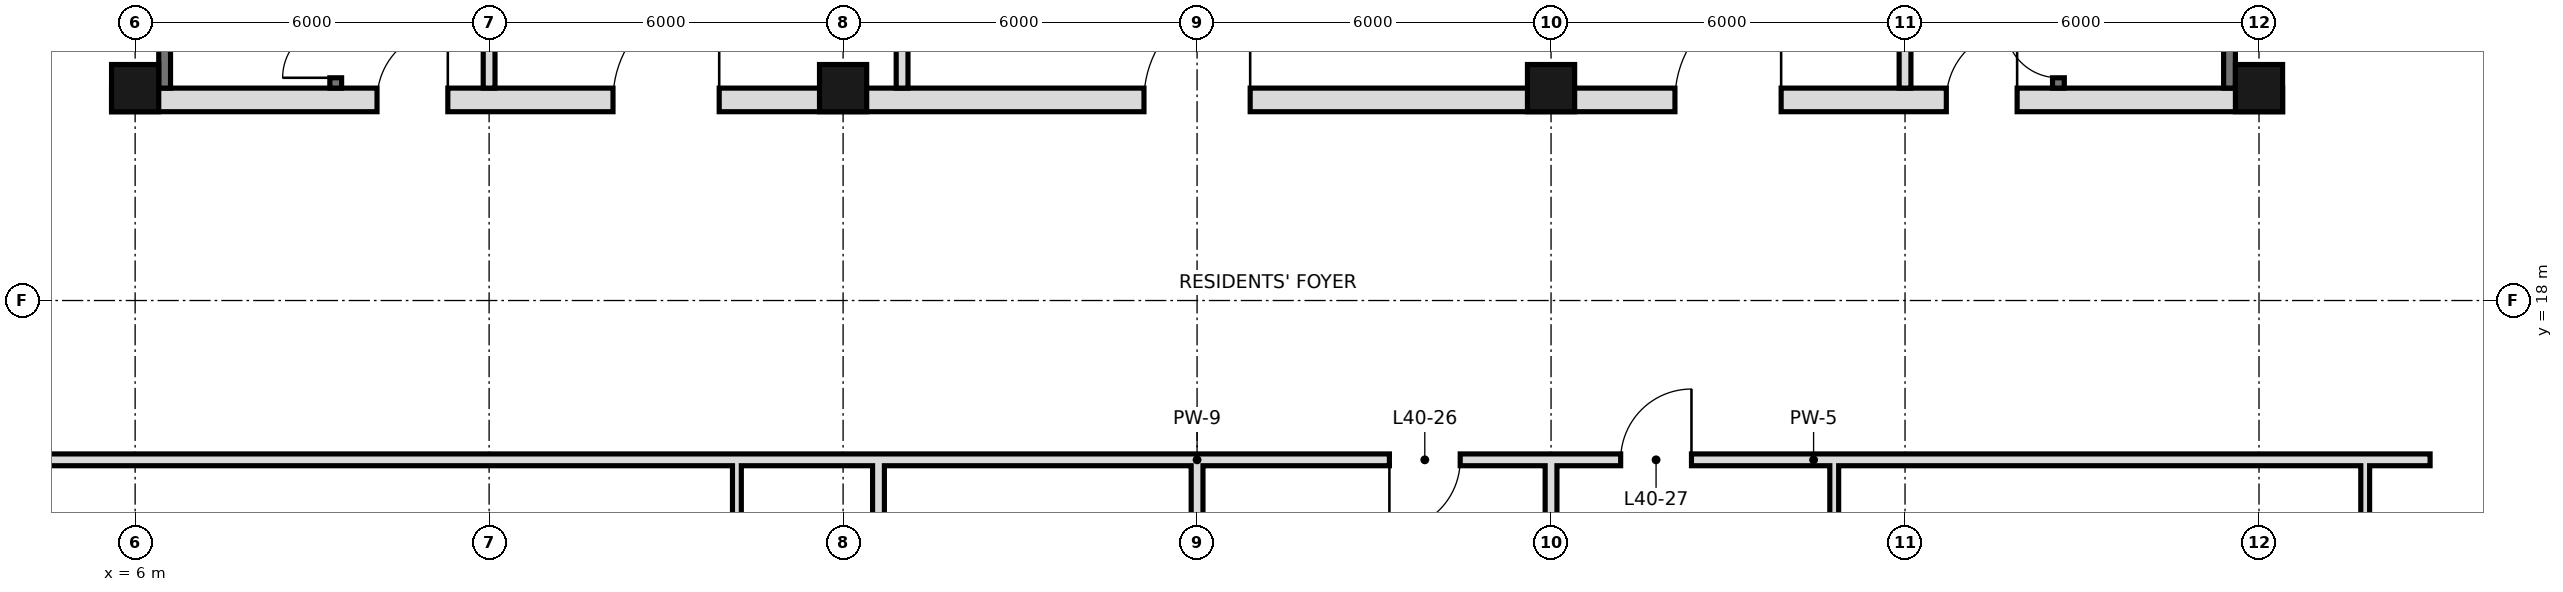
"""IFC4 building model, lengths in metres.
Left out: names, types, materials, properties, quantities, classifications, styles, units other than length and angle.
Written with IfcOpenShell. Run it as: python <this file> out.ifc"""

import sys

from ifc_helpers import new_model, si_unit, direction, frame, frame_2d, origin, origin_2d, place, context, subcontext, project, spatial, rectangle, hollow_rectangle, extrude, element, fill, save


model = new_model("IFC4")
c1 = context("Model", 3, precision=1e-05, world=origin(), true_north=direction((0.0, 1.0)))
c2 = subcontext(c1, "Body", "Model", "MODEL_VIEW")
j1 = project(units=[si_unit("LENGTHUNIT", "METRE"), si_unit("PLANEANGLEUNIT", "RADIAN")], contexts=[c1])
p1 = place(None, origin())
s1 = spatial("IfcSite", under=j1, at=p1, CompositionType="ELEMENT")
p2 = place(p1, origin())
s2 = spatial("IfcBuilding", under=s1, at=p2, CompositionType="ELEMENT")
p3 = place(p2, frame((0.0, 0.0, 174.4)))
s3 = spatial("IfcBuildingStorey", under=s2, at=p3, CompositionType="ELEMENT", Elevation=174.4)
for number, where, z_axis, x_axis in (
    (1, (6.0, 21.6, 0.0), (0.0, 0.0, 1.0), (1.0, 0.0, 0.0)),
    (2, (18.0, 21.6, 0.0), (0.0, 0.0, 1.0), (1.0, 0.0, 0.0)),
    (3, (30.0, 21.6, 0.0), (0.0, 0.0, 1.0), (1.0, 0.0, 0.0)),
    (4, (42.0, 21.6, 0.0), (0.0, 0.0, 1.0), (1.0, 0.0, 0.0)),
):
    element("IfcColumn", number, at=place(p3, frame(where, z_axis=z_axis, x_axis=x_axis)), inside=s3, PredefinedType="COLUMN", context=c2, shape_type="SweptSolid", body=[
        extrude(hollow_rectangle(XDim=0.8, YDim=0.8, WallThickness=0.045, at=origin_2d()), origin(), (0.0, 0.0, 1.0), 3.6),
    ])
p4 = place(p3, frame((16.2, 10.8, 0.0), z_axis=(0.0, 0.0, 1.0), x_axis=(0.0, 1.0, 0.0)))
e5 = element("IfcWall", 5, at=p4, inside=s3, PredefinedType="PARTITIONING", context=c2, shape_type="SweptSolid", body=[
    extrude(rectangle(XDim=4.5, YDim=0.15, at=frame_2d((2.25, 0.0))), origin(), (0.0, 0.0, 1.0), 3.42),
])
for number, where, z_axis, x_axis in (
    (6, (18.6, 10.8, 0.0), (0.0, 0.0, 1.0), (0.0, 1.0, 0.0)),
    (7, (24.0, 10.8, 0.0), (0.0, 0.0, 1.0), (0.0, 1.0, 0.0)),
):
    element("IfcWall", number, at=place(p3, frame(where, z_axis=z_axis, x_axis=x_axis)), inside=s3, PredefinedType="SOLIDWALL", context=c2, shape_type="SweptSolid", body=[
        extrude(rectangle(XDim=4.5, YDim=0.2, at=frame_2d((2.25, 0.0))), origin(), (0.0, 0.0, 1.0), 2.72),
    ])
p5 = place(p3, frame((30.0, -0.6, 0.0), z_axis=(0.0, 0.0, 1.0), x_axis=(0.0, 1.0, 0.0)))
e8 = element("IfcWall", 8, at=p5, inside=s3, PredefinedType="SOLIDWALL", context=c2, shape_type="SweptSolid", body=[
    extrude(rectangle(XDim=15.9, YDim=0.2, at=frame_2d((7.95, 0.0))), origin(), (0.0, 0.0, 1.0), 2.72),
])
for number, where, z_axis, x_axis in (
    (9, (34.8, 10.8, 0.0), (0.0, 0.0, 1.0), (0.0, 1.0, 0.0)),
    (10, (43.8, 10.8, 0.0), (0.0, 0.0, 1.0), (0.0, 1.0, 0.0)),
):
    element("IfcWall", number, at=place(p3, frame(where, z_axis=z_axis, x_axis=x_axis)), inside=s3, PredefinedType="PARTITIONING", context=c2, shape_type="SweptSolid", body=[
        extrude(rectangle(XDim=4.5, YDim=0.15, at=frame_2d((2.25, 0.0))), origin(), (0.0, 0.0, 1.0), 3.42),
    ])
p6 = place(p3, frame((3.1, 15.3, 0.0), z_axis=(0.0, 0.0, 1.0), x_axis=(1.0, 0.0, 0.0)))
e11 = element("IfcWall", 11, at=p6, inside=s3, PredefinedType="SOLIDWALL", context=c2, shape_type="SweptSolid", body=[
    extrude(rectangle(XDim=15.5, YDim=0.2, at=frame_2d((7.75, 0.0))), origin(), (0.0, 0.0, 1.0), 2.72),
])
p7 = place(p3, frame((24.0, 15.3, 0.0), z_axis=(0.0, 0.0, 1.0), x_axis=(1.0, 0.0, 0.0)))
e12 = element("IfcWall", 12, at=p7, inside=s3, PredefinedType="SOLIDWALL", context=c2, shape_type="SweptSolid", body=[
    extrude(rectangle(XDim=20.9, YDim=0.2, at=frame_2d((10.45, 0.0))), origin(), (0.0, 0.0, 1.0), 2.72),
])
p8 = place(p7, frame((3.26, 0.0, 0.0)))
e13 = element("IfcOpeningElement", 13, at=p8, cuts=e12, PredefinedType="OPENING", context=c2, shape_type="SweptSolid", body=[
    extrude(rectangle(XDim=1.2, YDim=2.4, at=frame_2d((0.6, 1.2))), frame((0.0, 0.11, 0.0), z_axis=(0.0, -1.0, 0.0), x_axis=(1.0, 0.0, 0.0)), (0.0, 0.0, 1.0), 0.22),
])
p9 = place(p7, frame((7.18, 0.0, 0.0)))
e14 = element("IfcOpeningElement", 14, at=p9, cuts=e12, PredefinedType="OPENING", context=c2, shape_type="SweptSolid", body=[
    extrude(rectangle(XDim=1.2, YDim=2.4, at=frame_2d((0.6, 1.2))), frame((0.0, 0.11, 0.0), z_axis=(0.0, -1.0, 0.0), x_axis=(1.0, 0.0, 0.0)), (0.0, 0.0, 1.0), 0.22),
])
p10 = place(p3, frame((18.6, 15.3, 0.0), z_axis=(0.0, 0.0, 1.0), x_axis=(1.0, 0.0, 0.0)))
e15 = element("IfcWall", 15, at=p10, inside=s3, PredefinedType="SOLIDWALL", context=c2, shape_type="SweptSolid", body=[
    extrude(rectangle(XDim=5.4, YDim=0.2, at=frame_2d((2.7, 0.0))), origin(), (0.0, 0.0, 1.0), 3.42),
])
for number, where, z_axis, x_axis in (
    (16, (6.5, 21.6, 0.0), (0.0, 0.0, 1.0), (0.0, 1.0, 0.0)),
    (17, (41.5, 21.6, 0.0), (0.0, 0.0, 1.0), (0.0, 1.0, 0.0)),
):
    element("IfcWall", number, at=place(p3, frame(where, z_axis=z_axis, x_axis=x_axis)), inside=s3, PredefinedType="SOLIDWALL", context=c2, shape_type="SweptSolid", body=[
        extrude(rectangle(XDim=23.5, YDim=0.2, at=frame_2d((11.75, 0.0))), origin(), (0.0, 0.0, 1.0), 3.42),
    ])
p11 = place(p3, frame((5.6, 21.4, 0.0), z_axis=(0.0, 0.0, 1.0), x_axis=(1.0, 0.0, 0.0)))
e18 = element("IfcWall", 18, at=p11, inside=s3, PredefinedType="SOLIDWALL", context=c2, shape_type="SweptSolid", body=[
    extrude(rectangle(XDim=36.8, YDim=0.4, at=frame_2d((18.4, 0.0))), origin(), (0.0, 0.0, 1.0), 3.42),
])
p12 = place(p11, frame((8.5, 0.0, 0.0)))
e19 = element("IfcOpeningElement", 19, at=p12, cuts=e18, PredefinedType="OPENING", context=c2, shape_type="SweptSolid", body=[
    extrude(rectangle(XDim=1.8, YDim=2.1, at=frame_2d((0.9, 1.05))), frame((0.0, 0.21, 0.0), z_axis=(0.0, -1.0, 0.0), x_axis=(1.0, 0.0, 0.0)), (0.0, 0.0, 1.0), 0.42),
])
p13 = place(p11, frame((17.5, 0.0, 0.0)))
e20 = element("IfcOpeningElement", 20, at=p13, cuts=e18, PredefinedType="OPENING", context=c2, shape_type="SweptSolid", body=[
    extrude(rectangle(XDim=1.8, YDim=2.1, at=frame_2d((0.9, 1.05))), frame((0.0, 0.21, 0.0), z_axis=(0.0, -1.0, 0.0), x_axis=(1.0, 0.0, 0.0)), (0.0, 0.0, 1.0), 0.42),
])
p14 = place(p11, frame((26.5, 0.0, 0.0)))
e21 = element("IfcOpeningElement", 21, at=p14, cuts=e18, PredefinedType="OPENING", context=c2, shape_type="SweptSolid", body=[
    extrude(rectangle(XDim=1.8, YDim=2.1, at=frame_2d((0.9, 1.05))), frame((0.0, 0.21, 0.0), z_axis=(0.0, -1.0, 0.0), x_axis=(1.0, 0.0, 0.0)), (0.0, 0.0, 1.0), 0.42),
])
p15 = place(p11, frame((4.5, 0.0, 0.0)))
e22 = element("IfcOpeningElement", 22, at=p15, cuts=e18, PredefinedType="OPENING", context=c2, shape_type="SweptSolid", body=[
    extrude(rectangle(XDim=1.2, YDim=2.1, at=frame_2d((0.6, 1.05))), frame((0.0, 0.21, 0.0), z_axis=(0.0, -1.0, 0.0), x_axis=(1.0, 0.0, 0.0)), (0.0, 0.0, 1.0), 0.42),
])
p16 = place(p11, frame((31.1, 0.0, 0.0)))
e23 = element("IfcOpeningElement", 23, at=p16, cuts=e18, PredefinedType="OPENING", context=c2, shape_type="SweptSolid", body=[
    extrude(rectangle(XDim=1.2, YDim=2.1, at=frame_2d((0.6, 1.05))), frame((0.0, 0.21, 0.0), z_axis=(0.0, -1.0, 0.0), x_axis=(1.0, 0.0, 0.0)), (0.0, 0.0, 1.0), 0.42),
])
p17 = place(p3, frame((19.0, 21.6, 0.0), z_axis=(0.0, 0.0, 1.0), x_axis=(0.0, 1.0, 0.0)))
e24 = element("IfcWall", 24, at=p17, inside=s3, PredefinedType="PARTITIONING", context=c2, shape_type="SweptSolid", body=[
    extrude(rectangle(XDim=6.0, YDim=0.2, at=frame_2d((3.0, 0.0))), origin(), (0.0, 0.0, 1.0), 3.42),
])
p18 = place(p17, frame((2.1, 0.0, 0.0)))
e25 = element("IfcOpeningElement", 25, at=p18, cuts=e24, PredefinedType="OPENING", context=c2, shape_type="SweptSolid", body=[
    extrude(rectangle(XDim=1.8, YDim=2.1, at=frame_2d((0.9, 1.05))), frame((0.0, 0.11, 0.0), z_axis=(0.0, -1.0, 0.0), x_axis=(1.0, 0.0, 0.0)), (0.0, 0.0, 1.0), 0.22),
])
for number, where, z_axis, x_axis in (
    (26, (12.0, 21.6, 0.0), (0.0, 0.0, 1.0), (0.0, 1.0, 0.0)),
    (27, (36.0, 21.6, 0.0), (0.0, 0.0, 1.0), (0.0, 1.0, 0.0)),
):
    element("IfcWall", number, at=place(p3, frame(where, z_axis=z_axis, x_axis=x_axis)), inside=s3, PredefinedType="PARTITIONING", context=c2, shape_type="SweptSolid", body=[
        extrude(rectangle(XDim=6.1, YDim=0.2, at=frame_2d((3.05, 0.0))), origin(), (0.0, 0.0, 1.0), 3.42),
    ])
p19 = place(p3, frame((38.6, 21.6, 0.0), z_axis=(0.0, 0.0, 1.0), x_axis=(0.0, 1.0, 0.0)))
e28 = element("IfcWall", 28, at=p19, inside=s3, PredefinedType="SOLIDWALL", context=c2, shape_type="SweptSolid", body=[
    extrude(rectangle(XDim=23.4, YDim=0.2, at=frame_2d((11.7, 0.0))), origin(), (0.0, 0.0, 1.0), 3.42),
])
p20 = place(p19, frame((7.0, 0.0, 0.0)))
e29 = element("IfcOpeningElement", 29, at=p20, cuts=e28, PredefinedType="OPENING", context=c2, shape_type="SweptSolid", body=[
    extrude(rectangle(XDim=1.1, YDim=2.1, at=frame_2d((0.55, 1.05))), frame((0.0, 0.11, 0.0), z_axis=(0.0, -1.0, 0.0), x_axis=(1.0, 0.0, 0.0)), (0.0, 0.0, 1.0), 0.22),
])
p21 = place(p19, frame((10.1, 0.0, 0.0)))
e30 = element("IfcOpeningElement", 30, at=p21, cuts=e28, PredefinedType="OPENING", context=c2, shape_type="SweptSolid", body=[
    extrude(rectangle(XDim=1.1, YDim=2.1, at=frame_2d((0.55, 1.05))), frame((0.0, 0.11, 0.0), z_axis=(0.0, -1.0, 0.0), x_axis=(1.0, 0.0, 0.0)), (0.0, 0.0, 1.0), 0.22),
])
p22 = place(p19, frame((13.2, 0.0, 0.0)))
e31 = element("IfcOpeningElement", 31, at=p22, cuts=e28, PredefinedType="OPENING", context=c2, shape_type="SweptSolid", body=[
    extrude(rectangle(XDim=1.1, YDim=2.1, at=frame_2d((0.55, 1.05))), frame((0.0, 0.11, 0.0), z_axis=(0.0, -1.0, 0.0), x_axis=(1.0, 0.0, 0.0)), (0.0, 0.0, 1.0), 0.22),
])
p23 = place(p19, frame((15.7, 0.0, 0.0)))
e32 = element("IfcOpeningElement", 32, at=p23, cuts=e28, PredefinedType="OPENING", context=c2, shape_type="SweptSolid", body=[
    extrude(rectangle(XDim=1.0, YDim=2.1, at=frame_2d((0.5, 1.05))), frame((0.0, 0.11, 0.0), z_axis=(0.0, -1.0, 0.0), x_axis=(1.0, 0.0, 0.0)), (0.0, 0.0, 1.0), 0.22),
])
p24 = place(p19, frame((0.175, 0.0, 0.0)))
e33 = element("IfcOpeningElement", 33, at=p24, cuts=e28, PredefinedType="OPENING", context=c2, shape_type="SweptSolid", body=[
    extrude(rectangle(XDim=0.9, YDim=2.1, at=frame_2d((0.45, 1.05))), frame((0.0, 0.11, 0.0), z_axis=(0.0, -1.0, 0.0), x_axis=(1.0, 0.0, 0.0)), (0.0, 0.0, 1.0), 0.22),
])
p25 = place(p3, frame((9.4, 21.6, 0.0), z_axis=(0.0, 0.0, 1.0), x_axis=(0.0, 1.0, 0.0)))
e34 = element("IfcWall", 34, at=p25, inside=s3, PredefinedType="SOLIDWALL", context=c2, shape_type="SweptSolid", body=[
    extrude(rectangle(XDim=23.4, YDim=0.2, at=frame_2d((11.7, 0.0))), origin(), (0.0, 0.0, 1.0), 3.42),
])
p26 = place(p25, frame((7.95, 0.0, 0.0)))
e35 = element("IfcOpeningElement", 35, at=p26, cuts=e34, PredefinedType="OPENING", context=c2, shape_type="SweptSolid", body=[
    extrude(rectangle(XDim=1.0, YDim=2.1, at=frame_2d((0.5, 1.05))), frame((0.0, 0.11, 0.0), z_axis=(0.0, -1.0, 0.0), x_axis=(1.0, 0.0, 0.0)), (0.0, 0.0, 1.0), 0.22),
])
p27 = place(p25, frame((12.6, 0.0, 0.0)))
e36 = element("IfcOpeningElement", 36, at=p27, cuts=e34, PredefinedType="OPENING", context=c2, shape_type="SweptSolid", body=[
    extrude(rectangle(XDim=1.0, YDim=2.1, at=frame_2d((0.5, 1.05))), frame((0.0, 0.11, 0.0), z_axis=(0.0, -1.0, 0.0), x_axis=(1.0, 0.0, 0.0)), (0.0, 0.0, 1.0), 0.22),
])
p28 = place(p25, frame((15.7, 0.0, 0.0)))
e37 = element("IfcOpeningElement", 37, at=p28, cuts=e34, PredefinedType="OPENING", context=c2, shape_type="SweptSolid", body=[
    extrude(rectangle(XDim=1.0, YDim=2.1, at=frame_2d((0.5, 1.05))), frame((0.0, 0.11, 0.0), z_axis=(0.0, -1.0, 0.0), x_axis=(1.0, 0.0, 0.0)), (0.0, 0.0, 1.0), 0.22),
])
p29 = place(p25, frame((0.175, 0.0, 0.0)))
e38 = element("IfcOpeningElement", 38, at=p29, cuts=e34, PredefinedType="OPENING", context=c2, shape_type="SweptSolid", body=[
    extrude(rectangle(XDim=0.9, YDim=2.1, at=frame_2d((0.45, 1.05))), frame((0.0, 0.11, 0.0), z_axis=(0.0, -1.0, 0.0), x_axis=(1.0, 0.0, 0.0)), (0.0, 0.0, 1.0), 0.22),
])
p30 = place(p8, frame((1.2, 0.0, 0.0), z_axis=(0.0, 0.0, 1.0), x_axis=(-1.0, 0.0, 0.0)))
e39 = element("IfcDoor", 39, at=p30, inside=s3, OperationType="SINGLE_SWING_RIGHT", PredefinedType="DOOR", context=c2, shape_type="SweptSolid", body=[
    extrude(rectangle(XDim=1.2, YDim=2.4, at=frame_2d((0.6, 1.2))), frame((0.0, 0.025, 0.0), z_axis=(0.0, -1.0, 0.0), x_axis=(1.0, 0.0, 0.0)), (0.0, 0.0, 1.0), 0.05),
])
fill(e13, e39)
p31 = place(p9, frame((1.2, 0.0, 0.0), z_axis=(0.0, 0.0, 1.0), x_axis=(-1.0, 0.0, 0.0)))
e40 = element("IfcDoor", 40, at=p31, inside=s3, OperationType="SINGLE_SWING_LEFT", PredefinedType="DOOR", context=c2, shape_type="SweptSolid", body=[
    extrude(rectangle(XDim=1.2, YDim=2.4, at=frame_2d((0.6, 1.2))), frame((0.0, 0.025, 0.0), z_axis=(0.0, -1.0, 0.0), x_axis=(1.0, 0.0, 0.0)), (0.0, 0.0, 1.0), 0.05),
])
fill(e14, e40)
p32 = place(p12, frame((1.8, 0.0, 0.0), z_axis=(0.0, 0.0, 1.0), x_axis=(-1.0, 0.0, 0.0)))
e41 = element("IfcDoor", 41, at=p32, inside=s3, OperationType="SINGLE_SWING_LEFT", PredefinedType="DOOR", context=c2, shape_type="SweptSolid", body=[
    extrude(rectangle(XDim=1.8, YDim=2.1, at=frame_2d((0.9, 1.05))), frame((0.0, 0.025, 0.0), z_axis=(0.0, -1.0, 0.0), x_axis=(1.0, 0.0, 0.0)), (0.0, 0.0, 1.0), 0.05),
])
fill(e19, e41)
p33 = place(p13, frame((1.8, 0.0, 0.0), z_axis=(0.0, 0.0, 1.0), x_axis=(-1.0, 0.0, 0.0)))
e42 = element("IfcDoor", 42, at=p33, inside=s3, OperationType="SINGLE_SWING_LEFT", PredefinedType="DOOR", context=c2, shape_type="SweptSolid", body=[
    extrude(rectangle(XDim=1.8, YDim=2.1, at=frame_2d((0.9, 1.05))), frame((0.0, 0.025, 0.0), z_axis=(0.0, -1.0, 0.0), x_axis=(1.0, 0.0, 0.0)), (0.0, 0.0, 1.0), 0.05),
])
fill(e20, e42)
p34 = place(p14, frame((1.8, 0.0, 0.0), z_axis=(0.0, 0.0, 1.0), x_axis=(-1.0, 0.0, 0.0)))
e43 = element("IfcDoor", 43, at=p34, inside=s3, OperationType="SINGLE_SWING_LEFT", PredefinedType="DOOR", context=c2, shape_type="SweptSolid", body=[
    extrude(rectangle(XDim=1.8, YDim=2.1, at=frame_2d((0.9, 1.05))), frame((0.0, 0.025, 0.0), z_axis=(0.0, -1.0, 0.0), x_axis=(1.0, 0.0, 0.0)), (0.0, 0.0, 1.0), 0.05),
])
fill(e21, e43)
p35 = place(p15, frame((1.2, 0.0, 0.0), z_axis=(0.0, 0.0, 1.0), x_axis=(-1.0, 0.0, 0.0)))
e44 = element("IfcDoor", 44, at=p35, inside=s3, OperationType="SINGLE_SWING_LEFT", PredefinedType="DOOR", context=c2, shape_type="SweptSolid", body=[
    extrude(rectangle(XDim=1.2, YDim=2.1, at=frame_2d((0.6, 1.05))), frame((0.0, 0.025, 0.0), z_axis=(0.0, -1.0, 0.0), x_axis=(1.0, 0.0, 0.0)), (0.0, 0.0, 1.0), 0.05),
])
fill(e22, e44)
p36 = place(p16, frame((1.2, 0.0, 0.0), z_axis=(0.0, 0.0, 1.0), x_axis=(-1.0, 0.0, 0.0)))
e45 = element("IfcDoor", 45, at=p36, inside=s3, OperationType="SINGLE_SWING_LEFT", PredefinedType="DOOR", context=c2, shape_type="SweptSolid", body=[
    extrude(rectangle(XDim=1.2, YDim=2.1, at=frame_2d((0.6, 1.05))), frame((0.0, 0.025, 0.0), z_axis=(0.0, -1.0, 0.0), x_axis=(1.0, 0.0, 0.0)), (0.0, 0.0, 1.0), 0.05),
])
fill(e23, e45)
p37 = place(p29, origin())
e46 = element("IfcDoor", 46, at=p37, inside=s3, OperationType="SINGLE_SWING_LEFT", PredefinedType="DOOR", context=c2, shape_type="SweptSolid", body=[
    extrude(rectangle(XDim=0.9, YDim=2.1, at=frame_2d((0.45, 1.05))), frame((0.0, 0.025, 0.0), z_axis=(0.0, -1.0, 0.0), x_axis=(1.0, 0.0, 0.0)), (0.0, 0.0, 1.0), 0.05),
])
fill(e38, e46)
p38 = place(p24, frame((0.9, 0.0, 0.0), z_axis=(0.0, 0.0, 1.0), x_axis=(-1.0, 0.0, 0.0)))
e47 = element("IfcDoor", 47, at=p38, inside=s3, OperationType="SINGLE_SWING_LEFT", PredefinedType="DOOR", context=c2, shape_type="SweptSolid", body=[
    extrude(rectangle(XDim=0.9, YDim=2.1, at=frame_2d((0.45, 1.05))), frame((0.0, 0.025, 0.0), z_axis=(0.0, -1.0, 0.0), x_axis=(1.0, 0.0, 0.0)), (0.0, 0.0, 1.0), 0.05),
])
fill(e33, e47)
save(model, sys.argv[1])
